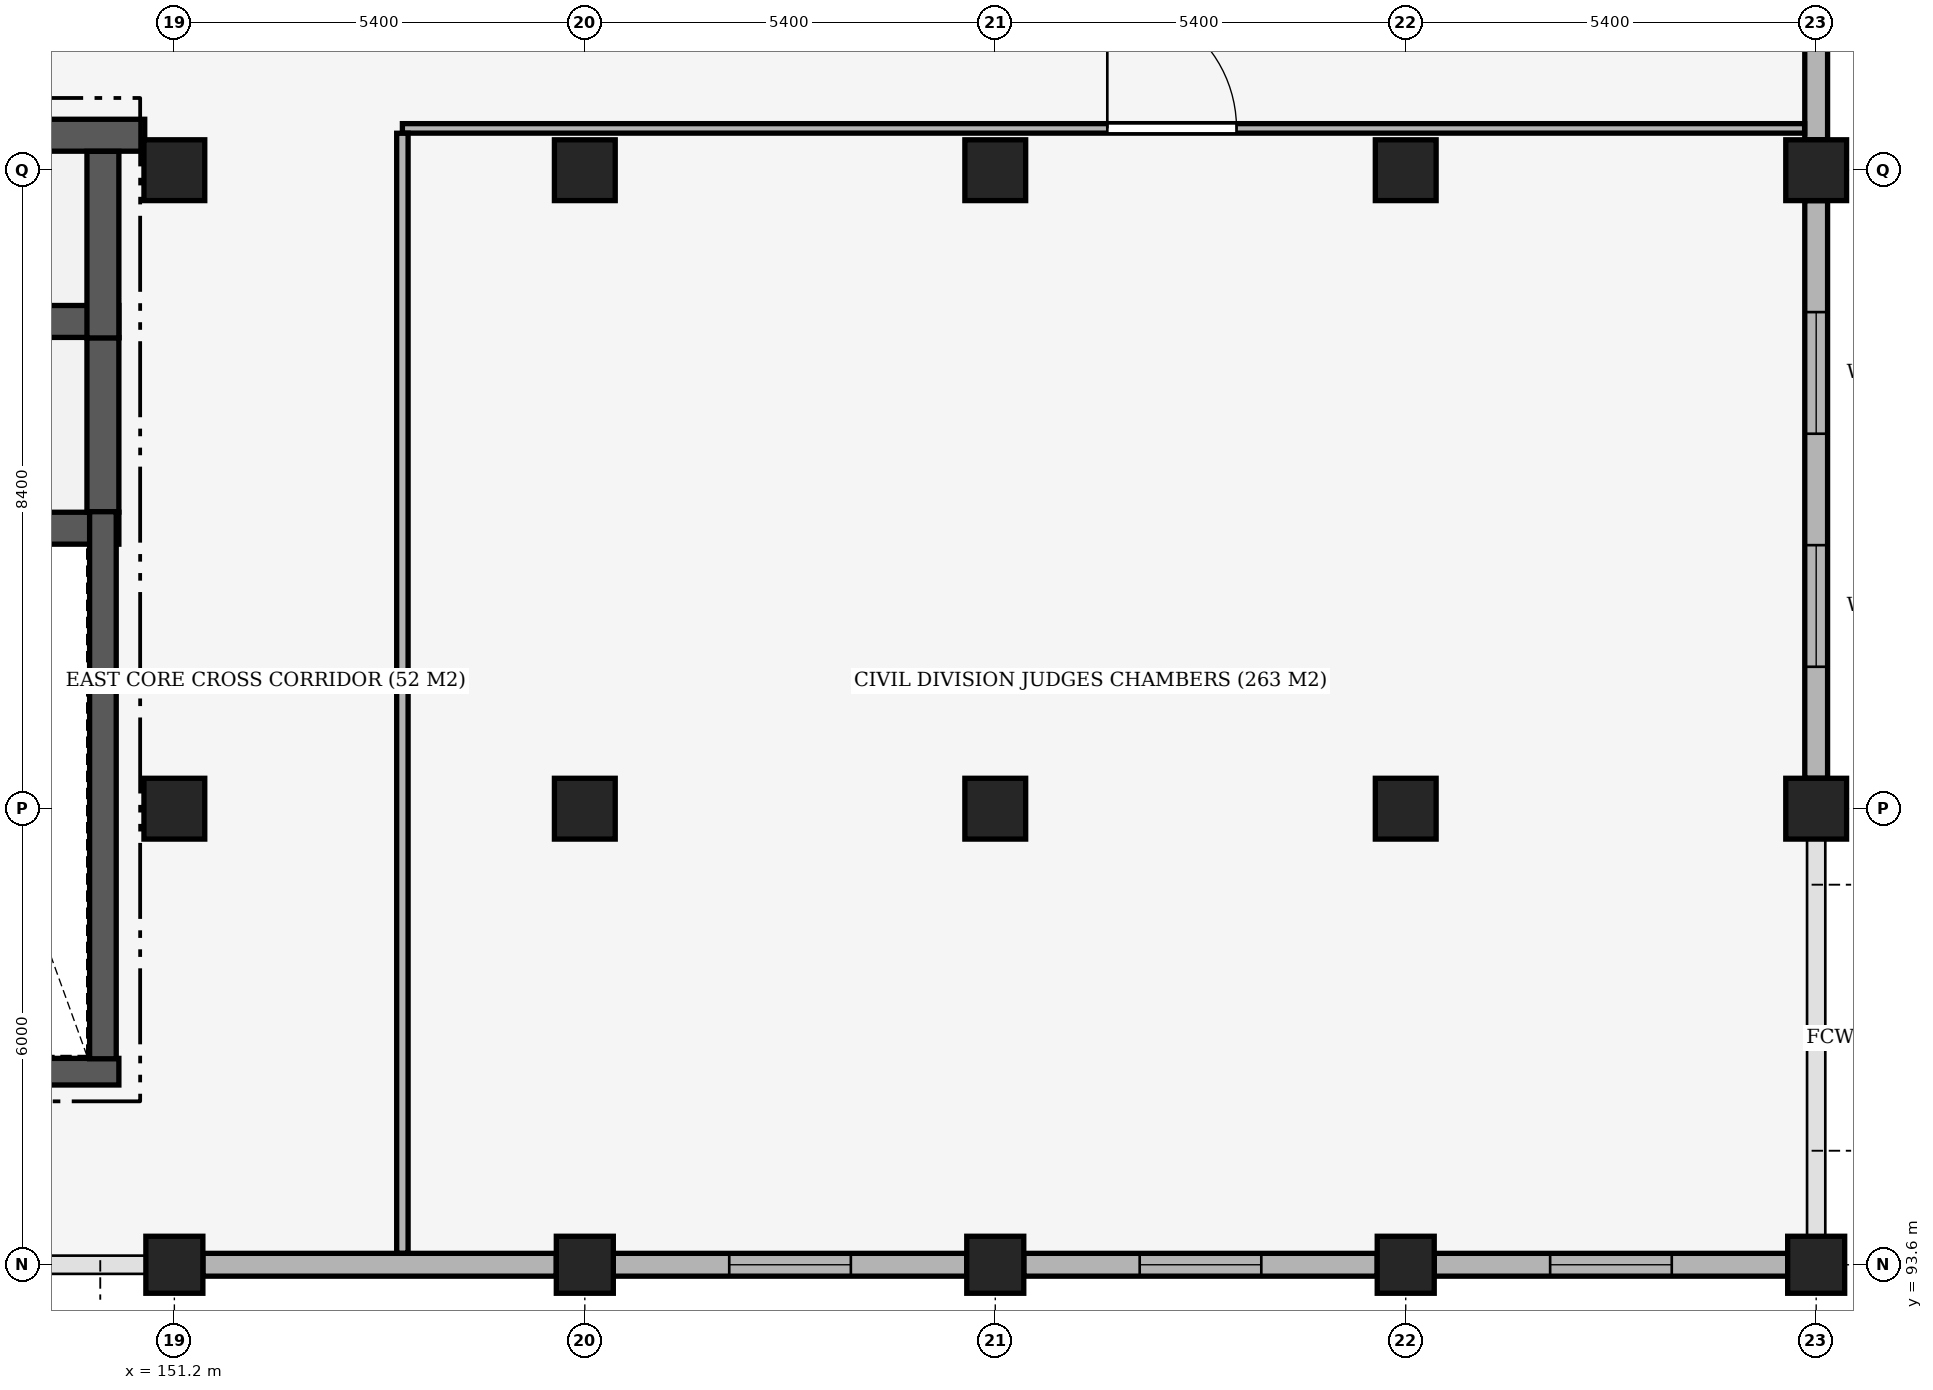
"""IFC4 building model, lengths in metres.
Left out: names, types, materials, properties, quantities, classifications, styles, units other than length and angle.
Written with IfcOpenShell. Run it as: python <this file> out.ifc"""

import sys

from ifc_helpers import new_model, si_unit, direction, frame, frame_2d, origin, origin_2d, place, context, subcontext, project, spatial, rectangle, extrude, element, fill, save


model = new_model("IFC4")
c1 = context("Model", 3, precision=1e-05, world=origin(), true_north=direction((0.0, 1.0)))
c2 = subcontext(c1, "Body", "Model", "MODEL_VIEW")
j1 = project(units=[si_unit("LENGTHUNIT", "METRE"), si_unit("PLANEANGLEUNIT", "RADIAN")], contexts=[c1])
p1 = place(None, origin())
s1 = spatial("IfcSite", under=j1, at=p1, CompositionType="ELEMENT")
p2 = place(p1, origin())
s2 = spatial("IfcBuilding", under=s1, at=p2, CompositionType="ELEMENT")
p3 = place(p2, frame((0.0, 0.0, 10.2)))
s3 = spatial("IfcBuildingStorey", under=s2, at=p3, CompositionType="ELEMENT", Elevation=10.2)
p4 = place(p3, frame((151.2, 93.6, 0.0), z_axis=(0.0, 0.0, 1.0), x_axis=(1.0, 0.0, 0.0)))
e1 = element("IfcColumn", 1, at=p4, inside=s3, PredefinedType="COLUMN", context=c2, shape_type="SweptSolid", body=[
    extrude(rectangle(XDim=0.75, YDim=0.75, at=origin_2d()), origin(), (0.0, 0.0, 1.0), 5.1),
])
for number, where, z_axis, x_axis in (
    (2, (151.2, 99.6, 0.0), (0.0, 0.0, 1.0), (1.0, 0.0, 0.0)),
    (3, (151.2, 108.0, 0.0), (0.0, 0.0, 1.0), (1.0, 0.0, 0.0)),
):
    element("IfcColumn", number, at=place(p3, frame(where, z_axis=z_axis, x_axis=x_axis)), inside=s3, PredefinedType="COLUMN", context=c2, shape_type="SweptSolid", body=[
        extrude(rectangle(XDim=0.8, YDim=0.8, at=origin_2d()), origin(), (0.0, 0.0, 1.0), 5.1),
    ])
p5 = place(p3, frame((156.6, 93.6, 0.0), z_axis=(0.0, 0.0, 1.0), x_axis=(1.0, 0.0, 0.0)))
e4 = element("IfcColumn", 4, at=p5, inside=s3, PredefinedType="COLUMN", context=c2, shape_type="SweptSolid", body=[
    extrude(rectangle(XDim=0.75, YDim=0.75, at=origin_2d()), origin(), (0.0, 0.0, 1.0), 5.1),
])
for number, where, z_axis, x_axis in (
    (5, (156.6, 99.6, 0.0), (0.0, 0.0, 1.0), (1.0, 0.0, 0.0)),
    (6, (156.6, 108.0, 0.0), (0.0, 0.0, 1.0), (1.0, 0.0, 0.0)),
):
    element("IfcColumn", number, at=place(p3, frame(where, z_axis=z_axis, x_axis=x_axis)), inside=s3, PredefinedType="COLUMN", context=c2, shape_type="SweptSolid", body=[
        extrude(rectangle(XDim=0.8, YDim=0.8, at=origin_2d()), origin(), (0.0, 0.0, 1.0), 5.1),
    ])
p6 = place(p3, frame((162.0, 93.6, 0.0), z_axis=(0.0, 0.0, 1.0), x_axis=(1.0, 0.0, 0.0)))
e7 = element("IfcColumn", 7, at=p6, inside=s3, PredefinedType="COLUMN", context=c2, shape_type="SweptSolid", body=[
    extrude(rectangle(XDim=0.75, YDim=0.75, at=origin_2d()), origin(), (0.0, 0.0, 1.0), 5.1),
])
for number, where, z_axis, x_axis in (
    (8, (162.0, 99.6, 0.0), (0.0, 0.0, 1.0), (1.0, 0.0, 0.0)),
    (9, (162.0, 108.0, 0.0), (0.0, 0.0, 1.0), (1.0, 0.0, 0.0)),
):
    element("IfcColumn", number, at=place(p3, frame(where, z_axis=z_axis, x_axis=x_axis)), inside=s3, PredefinedType="COLUMN", context=c2, shape_type="SweptSolid", body=[
        extrude(rectangle(XDim=0.8, YDim=0.8, at=origin_2d()), origin(), (0.0, 0.0, 1.0), 5.1),
    ])
p7 = place(p3, frame((167.4, 93.6, 0.0), z_axis=(0.0, 0.0, 1.0), x_axis=(1.0, 0.0, 0.0)))
e10 = element("IfcColumn", 10, at=p7, inside=s3, PredefinedType="COLUMN", context=c2, shape_type="SweptSolid", body=[
    extrude(rectangle(XDim=0.75, YDim=0.75, at=origin_2d()), origin(), (0.0, 0.0, 1.0), 5.1),
])
for number, where, z_axis, x_axis in (
    (11, (167.4, 99.6, 0.0), (0.0, 0.0, 1.0), (1.0, 0.0, 0.0)),
    (12, (167.4, 108.0, 0.0), (0.0, 0.0, 1.0), (1.0, 0.0, 0.0)),
):
    element("IfcColumn", number, at=place(p3, frame(where, z_axis=z_axis, x_axis=x_axis)), inside=s3, PredefinedType="COLUMN", context=c2, shape_type="SweptSolid", body=[
        extrude(rectangle(XDim=0.8, YDim=0.8, at=origin_2d()), origin(), (0.0, 0.0, 1.0), 5.1),
    ])
p8 = place(p3, frame((172.8, 93.6, 0.0), z_axis=(0.0, 0.0, 1.0), x_axis=(1.0, 0.0, 0.0)))
e13 = element("IfcColumn", 13, at=p8, inside=s3, PredefinedType="COLUMN", context=c2, shape_type="SweptSolid", body=[
    extrude(rectangle(XDim=0.75, YDim=0.75, at=origin_2d()), origin(), (0.0, 0.0, 1.0), 5.1),
])
for number, where, z_axis, x_axis in (
    (14, (172.8, 99.6, 0.0), (0.0, 0.0, 1.0), (1.0, 0.0, 0.0)),
    (15, (172.8, 108.0, 0.0), (0.0, 0.0, 1.0), (1.0, 0.0, 0.0)),
):
    element("IfcColumn", number, at=place(p3, frame(where, z_axis=z_axis, x_axis=x_axis)), inside=s3, PredefinedType="COLUMN", context=c2, shape_type="SweptSolid", body=[
        extrude(rectangle(XDim=0.8, YDim=0.8, at=origin_2d()), origin(), (0.0, 0.0, 1.0), 5.1),
    ])
p9 = place(p3, frame((172.8, 113.0, 0.0), z_axis=(0.0, 0.0, 1.0), x_axis=(0.0, -1.0, 0.0)))
e16 = element("IfcWall", 16, at=p9, inside=s3, PredefinedType="SOLIDWALL", context=c2, shape_type="SweptSolid", body=[
    extrude(rectangle(XDim=4.6, YDim=0.3, at=frame_2d((2.3, 0.0))), origin(), (0.0, 0.0, 1.0), 4.27),
])
p10 = place(p9, frame((1.5, 0.0, 1.05)))
e17 = element("IfcOpeningElement", 17, at=p10, cuts=e16, PredefinedType="OPENING", context=c2, shape_type="SweptSolid", body=[
    extrude(rectangle(XDim=1.6, YDim=1.8, at=frame_2d((0.8, 0.9))), frame((0.0, 0.165, 0.0), z_axis=(0.0, -1.0, 0.0), x_axis=(1.0, 0.0, 0.0)), (0.0, 0.0, 1.0), 0.33),
])
p11 = place(p3, frame((172.8, 107.6, 0.0), z_axis=(0.0, 0.0, 1.0), x_axis=(0.0, -1.0, 0.0)))
e18 = element("IfcWall", 18, at=p11, inside=s3, PredefinedType="SOLIDWALL", context=c2, shape_type="SweptSolid", body=[
    extrude(rectangle(XDim=7.6, YDim=0.3, at=frame_2d((3.8, 0.0))), origin(), (0.0, 0.0, 1.0), 4.12),
])
p12 = place(p11, frame((1.467, 0.0, 1.05)))
e19 = element("IfcOpeningElement", 19, at=p12, cuts=e18, PredefinedType="OPENING", context=c2, shape_type="SweptSolid", body=[
    extrude(rectangle(XDim=1.6, YDim=1.8, at=frame_2d((0.8, 0.9))), frame((0.0, 0.165, 0.0), z_axis=(0.0, -1.0, 0.0), x_axis=(1.0, 0.0, 0.0)), (0.0, 0.0, 1.0), 0.33),
])
p13 = place(p11, frame((4.533, 0.0, 1.05)))
e20 = element("IfcOpeningElement", 20, at=p13, cuts=e18, PredefinedType="OPENING", context=c2, shape_type="SweptSolid", body=[
    extrude(rectangle(XDim=1.6, YDim=1.8, at=frame_2d((0.8, 0.9))), frame((0.0, 0.165, 0.0), z_axis=(0.0, -1.0, 0.0), x_axis=(1.0, 0.0, 0.0)), (0.0, 0.0, 1.0), 0.33),
])
p14 = place(p3, frame((172.425, 93.6, 0.0), z_axis=(0.0, 0.0, 1.0), x_axis=(-1.0, 0.0, 0.0)))
e21 = element("IfcWall", 21, at=p14, inside=s3, PredefinedType="SOLIDWALL", context=c2, shape_type="SweptSolid", body=[
    extrude(rectangle(XDim=4.65, YDim=0.3, at=frame_2d((2.325, 0.0))), origin(), (0.0, 0.0, 1.0), 4.22),
])
p15 = place(p14, frame((1.525, 0.0, 1.05)))
e22 = element("IfcOpeningElement", 22, at=p15, cuts=e21, PredefinedType="OPENING", context=c2, shape_type="SweptSolid", body=[
    extrude(rectangle(XDim=1.6, YDim=1.8, at=frame_2d((0.8, 0.9))), frame((0.0, 0.165, 0.0), z_axis=(0.0, -1.0, 0.0), x_axis=(1.0, 0.0, 0.0)), (0.0, 0.0, 1.0), 0.33),
])
p16 = place(p3, frame((167.025, 93.6, 0.0), z_axis=(0.0, 0.0, 1.0), x_axis=(-1.0, 0.0, 0.0)))
e23 = element("IfcWall", 23, at=p16, inside=s3, PredefinedType="SOLIDWALL", context=c2, shape_type="SweptSolid", body=[
    extrude(rectangle(XDim=4.65, YDim=0.3, at=frame_2d((2.325, 0.0))), origin(), (0.0, 0.0, 1.0), 4.22),
])
p17 = place(p16, frame((1.525, 0.0, 1.05)))
e24 = element("IfcOpeningElement", 24, at=p17, cuts=e23, PredefinedType="OPENING", context=c2, shape_type="SweptSolid", body=[
    extrude(rectangle(XDim=1.6, YDim=1.8, at=frame_2d((0.8, 0.9))), frame((0.0, 0.165, 0.0), z_axis=(0.0, -1.0, 0.0), x_axis=(1.0, 0.0, 0.0)), (0.0, 0.0, 1.0), 0.33),
])
p18 = place(p3, frame((161.625, 93.6, 0.0), z_axis=(0.0, 0.0, 1.0), x_axis=(-1.0, 0.0, 0.0)))
e25 = element("IfcWall", 25, at=p18, inside=s3, PredefinedType="SOLIDWALL", context=c2, shape_type="SweptSolid", body=[
    extrude(rectangle(XDim=4.65, YDim=0.3, at=frame_2d((2.325, 0.0))), origin(), (0.0, 0.0, 1.0), 4.22),
])
p19 = place(p18, frame((1.525, 0.0, 1.05)))
e26 = element("IfcOpeningElement", 26, at=p19, cuts=e25, PredefinedType="OPENING", context=c2, shape_type="SweptSolid", body=[
    extrude(rectangle(XDim=1.6, YDim=1.8, at=frame_2d((0.8, 0.9))), frame((0.0, 0.165, 0.0), z_axis=(0.0, -1.0, 0.0), x_axis=(1.0, 0.0, 0.0)), (0.0, 0.0, 1.0), 0.33),
])
p20 = place(p3, frame((156.225, 93.6, 0.0), z_axis=(0.0, 0.0, 1.0), x_axis=(-1.0, 0.0, 0.0)))
e27 = element("IfcWall", 27, at=p20, inside=s3, PredefinedType="SOLIDWALL", context=c2, shape_type="SweptSolid", body=[
    extrude(rectangle(XDim=4.65, YDim=0.3, at=frame_2d((2.325, 0.0))), origin(), (0.0, 0.0, 1.0), 4.22),
])
p21 = place(p3, frame((147.573, 103.29, 0.0), z_axis=(0.0, 0.0, 1.0), x_axis=(1.0, 0.0, 0.0)))
e28 = element("IfcWall", 28, at=p21, inside=s3, PredefinedType="SHEAR", context=c2, shape_type="SweptSolid", body=[
    extrude(rectangle(XDim=2.897, YDim=0.42, at=frame_2d((1.448, 0.0))), origin(), (0.0, 0.0, 1.0), 4.82),
])
p22 = place(p3, frame((147.13, 106.01, 0.0), z_axis=(0.0, 0.0, 1.0), x_axis=(1.0, 0.0, 0.0)))
e29 = element("IfcWall", 29, at=p22, inside=s3, PredefinedType="SHEAR", context=c2, shape_type="SweptSolid", body=[
    extrude(rectangle(XDim=3.34, YDim=0.42, at=frame_2d((1.67, 0.0))), origin(), (0.0, 0.0, 1.0), 4.82),
])
p23 = place(p3, frame((150.26, 103.502, 0.0), z_axis=(0.0, 0.0, 1.0), x_axis=(0.0, 1.0, 0.0)))
e30 = element("IfcWall", 30, at=p23, inside=s3, PredefinedType="SHEAR", context=c2, shape_type="SweptSolid", body=[
    extrude(rectangle(XDim=2.296, YDim=0.42, at=frame_2d((1.148, 0.0))), origin(), (0.0, 0.0, 1.0), 4.82),
])
p24 = place(p3, frame((147.13, 108.46, 0.0), z_axis=(0.0, 0.0, 1.0), x_axis=(1.0, 0.0, 0.0)))
e31 = element("IfcWall", 31, at=p24, inside=s3, PredefinedType="SHEAR", context=c2, shape_type="SweptSolid", body=[
    extrude(rectangle(XDim=3.68, YDim=0.42, at=frame_2d((1.84, 0.0))), origin(), (0.0, 0.0, 1.0), 4.82),
])
p25 = place(p3, frame((150.26, 105.793, 0.0), z_axis=(0.0, 0.0, 1.0), x_axis=(0.0, 1.0, 0.0)))
e32 = element("IfcWall", 32, at=p25, inside=s3, PredefinedType="SHEAR", context=c2, shape_type="SweptSolid", body=[
    extrude(rectangle(XDim=2.455, YDim=0.42, at=frame_2d((1.228, 0.0))), origin(), (0.0, 0.0, 1.0), 4.82),
])
p26 = place(p3, frame((147.62, 96.14, 0.0), z_axis=(0.0, 0.0, 1.0), x_axis=(1.0, 0.0, 0.0)))
e33 = element("IfcWall", 33, at=p26, inside=s3, PredefinedType="SHEAR", context=c2, shape_type="SweptSolid", body=[
    extrude(rectangle(XDim=2.85, YDim=0.35, at=frame_2d((1.425, 0.0))), origin(), (0.0, 0.0, 1.0), 4.82),
])
p27 = place(p3, frame((150.26, 96.31, 0.0), z_axis=(0.0, 0.0, 1.0), x_axis=(0.0, 1.0, 0.0)))
e34 = element("IfcWall", 34, at=p27, inside=s3, PredefinedType="SHEAR", context=c2, shape_type="SweptSolid", body=[
    extrude(rectangle(XDim=7.197, YDim=0.35, at=frame_2d((3.599, 0.0))), origin(), (0.0, 0.0, 1.0), 4.82),
])
p28 = place(p3, frame((154.2, 108.55, 0.0), z_axis=(0.0, 0.0, 1.0), x_axis=(1.0, 0.0, 0.0)))
e35 = element("IfcWall", 35, at=p28, inside=s3, PredefinedType="PARTITIONING", context=c2, shape_type="SweptSolid", body=[
    extrude(rectangle(XDim=18.448, YDim=0.125, at=frame_2d((9.224, 0.0))), origin(), (0.0, 0.0, 1.0), 4.27),
])
p29 = place(p28, frame((9.274, 0.0, 0.0)))
e36 = element("IfcOpeningElement", 36, at=p29, cuts=e35, PredefinedType="OPENING", context=c2, shape_type="SweptSolid", body=[
    extrude(rectangle(XDim=1.7, YDim=2.35, at=frame_2d((0.85, 1.175))), frame((0.0, 0.077, 0.0), z_axis=(0.0, -1.0, 0.0), x_axis=(1.0, 0.0, 0.0)), (0.0, 0.0, 1.0), 0.155),
])
p30 = place(p3, frame((154.2, 93.752, 0.0), z_axis=(0.0, 0.0, 1.0), x_axis=(0.0, 1.0, 0.0)))
e37 = element("IfcWall", 37, at=p30, inside=s3, PredefinedType="PARTITIONING", context=c2, shape_type="SweptSolid", body=[
    extrude(rectangle(XDim=14.734, YDim=0.15, at=frame_2d((7.367, 0.0))), origin(), (0.0, 0.0, 1.0), 4.22),
])
p31 = place(p12, origin())
e38 = element("IfcWindow", 38, at=p31, inside=s3, PartitioningType="SINGLE_PANEL", PredefinedType="WINDOW", context=c2, shape_type="SweptSolid", body=[
    extrude(rectangle(XDim=1.6, YDim=1.8, at=frame_2d((0.8, 0.9))), frame((0.0, 0.03, 0.0), z_axis=(0.0, -1.0, 0.0), x_axis=(1.0, 0.0, 0.0)), (0.0, 0.0, 1.0), 0.06),
])
fill(e19, e38)
p32 = place(p13, origin())
e39 = element("IfcWindow", 39, at=p32, inside=s3, PartitioningType="SINGLE_PANEL", PredefinedType="WINDOW", context=c2, shape_type="SweptSolid", body=[
    extrude(rectangle(XDim=1.6, YDim=1.8, at=frame_2d((0.8, 0.9))), frame((0.0, 0.03, 0.0), z_axis=(0.0, -1.0, 0.0), x_axis=(1.0, 0.0, 0.0)), (0.0, 0.0, 1.0), 0.06),
])
fill(e20, e39)
p33 = place(p15, origin())
e40 = element("IfcWindow", 40, at=p33, inside=s3, PartitioningType="SINGLE_PANEL", PredefinedType="WINDOW", context=c2, shape_type="SweptSolid", body=[
    extrude(rectangle(XDim=1.6, YDim=1.8, at=frame_2d((0.8, 0.9))), frame((0.0, 0.03, 0.0), z_axis=(0.0, -1.0, 0.0), x_axis=(1.0, 0.0, 0.0)), (0.0, 0.0, 1.0), 0.06),
])
fill(e22, e40)
p34 = place(p17, origin())
e41 = element("IfcWindow", 41, at=p34, inside=s3, PartitioningType="SINGLE_PANEL", PredefinedType="WINDOW", context=c2, shape_type="SweptSolid", body=[
    extrude(rectangle(XDim=1.6, YDim=1.8, at=frame_2d((0.8, 0.9))), frame((0.0, 0.03, 0.0), z_axis=(0.0, -1.0, 0.0), x_axis=(1.0, 0.0, 0.0)), (0.0, 0.0, 1.0), 0.06),
])
fill(e24, e41)
p35 = place(p19, origin())
e42 = element("IfcWindow", 42, at=p35, inside=s3, PartitioningType="SINGLE_PANEL", PredefinedType="WINDOW", context=c2, shape_type="SweptSolid", body=[
    extrude(rectangle(XDim=1.6, YDim=1.8, at=frame_2d((0.8, 0.9))), frame((0.0, 0.03, 0.0), z_axis=(0.0, -1.0, 0.0), x_axis=(1.0, 0.0, 0.0)), (0.0, 0.0, 1.0), 0.06),
])
fill(e26, e42)
p36 = place(p29, origin())
e43 = element("IfcDoor", 43, at=p36, inside=s3, OperationType="SINGLE_SWING_LEFT", PredefinedType="DOOR", context=c2, shape_type="SweptSolid", body=[
    extrude(rectangle(XDim=1.7, YDim=2.35, at=frame_2d((0.85, 1.175))), frame((0.0, 0.025, 0.0), z_axis=(0.0, -1.0, 0.0), x_axis=(1.0, 0.0, 0.0)), (0.0, 0.0, 1.0), 0.05),
])
fill(e36, e43)
save(model, sys.argv[1])
